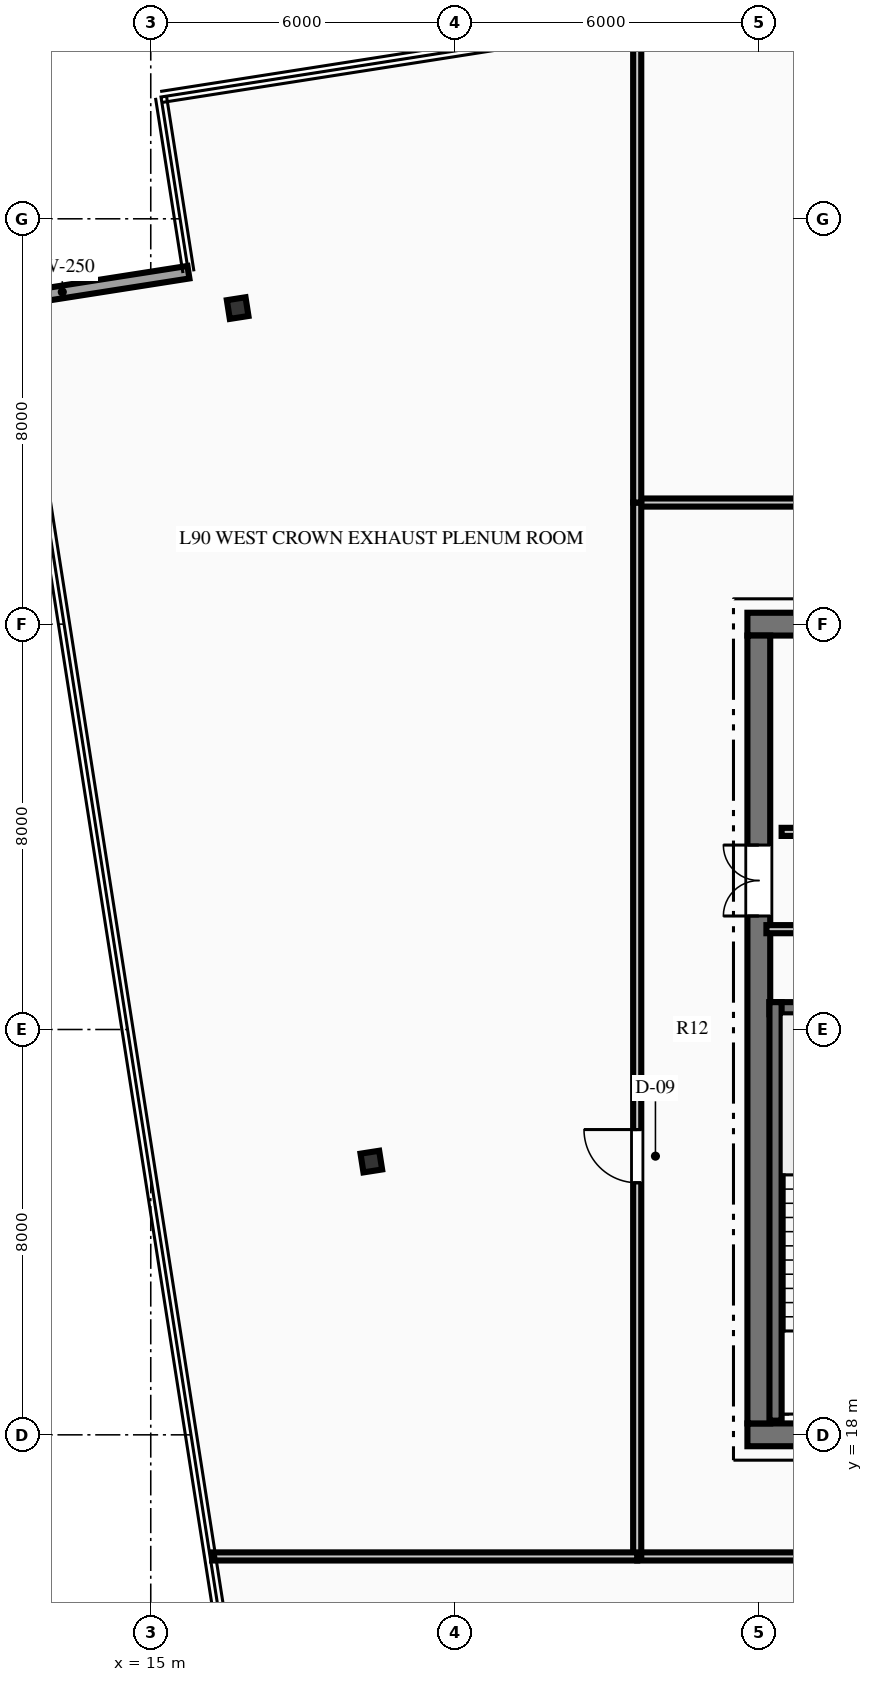
"""IFC4 building model, lengths in metres.
Left out: names, types, materials, properties, quantities, classifications, styles, units other than length and angle.
Written with IfcOpenShell. Run it as: python <this file> out.ifc"""

import sys

from ifc_helpers import new_model, si_unit, direction, frame, frame_2d, origin, origin_2d, place, context, subcontext, project, spatial, rectangle, i_section, extrude, element, fill, save


model = new_model("IFC4")
c1 = context("Model", 3, precision=1e-05, world=origin(), true_north=direction((0.0, 1.0)))
c2 = subcontext(c1, "Body", "Model", "MODEL_VIEW")
j1 = project(units=[si_unit("LENGTHUNIT", "METRE"), si_unit("PLANEANGLEUNIT", "RADIAN")], contexts=[c1])
p1 = place(None, origin())
s1 = spatial("IfcSite", under=j1, at=p1, CompositionType="ELEMENT")
p2 = place(p1, origin())
s2 = spatial("IfcBuilding", under=s1, at=p2, CompositionType="ELEMENT")
p3 = place(p2, frame((0.0, 0.0, 356.4)))
s3 = spatial("IfcBuildingStorey", under=s2, at=p3, CompositionType="ELEMENT", Elevation=356.4)
p4 = place(p3, frame((26.775, 18.0, 0.0), z_axis=(0.0, 0.0, 1.0), x_axis=(1.0, 0.0, 0.0)))
e1 = element("IfcWall", 1, at=p4, inside=s3, PredefinedType="SHEAR", context=c2, shape_type="SweptSolid", body=[
    extrude(rectangle(XDim=18.45, YDim=0.45, at=frame_2d((9.225, 0.0))), origin(), (0.0, 0.0, 1.0), 4.2),
])
p5 = place(p4, frame((7.325, 0.0, 0.0)))
e2 = element("IfcOpeningElement", 2, at=p5, cuts=e1, PredefinedType="OPENING", context=c2, shape_type="SweptSolid", body=[
    extrude(rectangle(XDim=1.1, YDim=2.15, at=frame_2d((0.55, 1.075))), frame((0.0, 0.235, 0.0), z_axis=(0.0, -1.0, 0.0), x_axis=(1.0, 0.0, 0.0)), (0.0, 0.0, 1.0), 0.47),
])
p6 = place(p4, frame((10.025, 0.0, 0.0)))
e3 = element("IfcOpeningElement", 3, at=p6, cuts=e1, PredefinedType="OPENING", context=c2, shape_type="SweptSolid", body=[
    extrude(rectangle(XDim=1.1, YDim=2.15, at=frame_2d((0.55, 1.075))), frame((0.0, 0.235, 0.0), z_axis=(0.0, -1.0, 0.0), x_axis=(1.0, 0.0, 0.0)), (0.0, 0.0, 1.0), 0.47),
])
p7 = place(p3, frame((26.775, 34.0, 0.0), z_axis=(0.0, 0.0, 1.0), x_axis=(1.0, 0.0, 0.0)))
e4 = element("IfcWall", 4, at=p7, inside=s3, PredefinedType="SHEAR", context=c2, shape_type="SweptSolid", body=[
    extrude(rectangle(XDim=18.45, YDim=0.45, at=frame_2d((9.225, 0.0))), origin(), (0.0, 0.0, 1.0), 4.2),
])
p8 = place(p3, frame((27.0, 18.225, 0.0), z_axis=(0.0, 0.0, 1.0), x_axis=(0.0, 1.0, 0.0)))
e5 = element("IfcWall", 5, at=p8, inside=s3, PredefinedType="SHEAR", context=c2, shape_type="SweptSolid", body=[
    extrude(rectangle(XDim=15.55, YDim=0.45, at=frame_2d((7.775, 0.0))), origin(), (0.0, 0.0, 1.0), 4.2),
])
p9 = place(p8, frame((10.015, 0.0, 0.0)))
e6 = element("IfcOpeningElement", 6, at=p9, cuts=e5, PredefinedType="OPENING", context=c2, shape_type="SweptSolid", body=[
    extrude(rectangle(XDim=1.4, YDim=2.2, at=frame_2d((0.7, 1.1))), frame((0.0, 0.235, 0.0), z_axis=(0.0, -1.0, 0.0), x_axis=(1.0, 0.0, 0.0)), (0.0, 0.0, 1.0), 0.47),
])
p10 = place(p3, frame((27.21, 26.42, 0.0), z_axis=(0.0, 0.0, 1.0), x_axis=(1.0, 0.0, 0.0)))
e7 = element("IfcWall", 7, at=p10, inside=s3, PredefinedType="SHEAR", context=c2, shape_type="SweptSolid", body=[
    extrude(rectangle(XDim=3.98, YDim=0.24, at=frame_2d((1.99, 0.0))), origin(), (0.0, 0.0, 1.0), 4.2),
])
p11 = place(p3, frame((27.33, 18.28, 0.0), z_axis=(0.0, 0.0, 1.0), x_axis=(0.0, 1.0, 0.0)))
e8 = element("IfcWall", 8, at=p11, inside=s3, PredefinedType="SHEAR", context=c2, shape_type="SweptSolid", body=[
    extrude(rectangle(XDim=8.26, YDim=0.24, at=frame_2d((4.13, 0.0))), origin(), (0.0, 0.0, 1.0), 4.2),
])
for number, where, z_axis, x_axis in (
    (9, (16.715, 40.238, 0.0), (0.0, 0.0, 1.0), (-0.155, 0.988, 0.0)),
    (10, (19.353, 23.393, 0.0), (0.0, 0.0, 1.0), (-0.155, 0.988, 0.0)),
):
    element("IfcColumn", number, at=place(p3, frame(where, z_axis=z_axis, x_axis=x_axis)), inside=s3, PredefinedType="COLUMN", context=c2, shape_type="SweptSolid", body=[
        extrude(i_section(OverallWidth=0.374, OverallDepth=0.373, WebThickness=0.016, FlangeThickness=0.026, at=origin_2d()), origin(), (0.0, 0.0, 1.0), 4.2),
    ])
p12 = place(p3, frame((12.286, 40.405, 0.0), z_axis=(0.0, 0.0, 1.0), x_axis=(0.987960113204, 0.154708806205, 0.0)))
e11 = element("IfcWall", 11, at=p12, inside=s3, PredefinedType="STANDARD", context=c2, shape_type="SweptSolid", body=[
    extrude(rectangle(XDim=3.5, YDim=0.25, at=frame_2d((1.75, 0.0))), origin(), (0.0, 0.0, 1.0), 3.93),
])
p13 = place(p3, frame((27.15, 27.98, 0.0), z_axis=(0.0, 0.0, 1.0), x_axis=(1.0, 0.0, 0.0)))
e12 = element("IfcWall", 12, at=p13, inside=s3, PredefinedType="PARTITIONING", context=c2, shape_type="SweptSolid", body=[
    extrude(rectangle(XDim=4.05, YDim=0.16, at=frame_2d((2.025, 0.0))), origin(), (0.0, 0.0, 1.0), 3.93),
])
p14 = place(p13, frame((1.575, 0.0, 0.0)))
e13 = element("IfcOpeningElement", 13, at=p14, cuts=e12, PredefinedType="OPENING", context=c2, shape_type="SweptSolid", body=[
    extrude(rectangle(XDim=0.95, YDim=2.15, at=frame_2d((0.475, 1.075))), frame((0.0, 0.09, 0.0), z_axis=(0.0, -1.0, 0.0), x_axis=(1.0, 0.0, 0.0)), (0.0, 0.0, 1.0), 0.18),
])
p15 = place(p3, frame((27.45, 29.9, 0.0), z_axis=(0.0, 0.0, 1.0), x_axis=(1.0, 0.0, 0.0)))
e14 = element("IfcWall", 14, at=p15, inside=s3, PredefinedType="PARTITIONING", context=c2, shape_type="SweptSolid", body=[
    extrude(rectangle(XDim=4.43, YDim=0.16, at=frame_2d((2.215, 0.0))), origin(), (0.0, 0.0, 1.0), 3.93),
])
p16 = place(p15, frame((1.675, 0.0, 0.0)))
e15 = element("IfcOpeningElement", 15, at=p16, cuts=e14, PredefinedType="OPENING", context=c2, shape_type="SweptSolid", body=[
    extrude(rectangle(XDim=0.95, YDim=2.15, at=frame_2d((0.475, 1.075))), frame((0.0, 0.09, 0.0), z_axis=(0.0, -1.0, 0.0), x_axis=(1.0, 0.0, 0.0)), (0.0, 0.0, 1.0), 0.18),
])
p17 = place(p3, frame((24.6, 15.6, 0.0), z_axis=(0.0, 0.0, 1.0), x_axis=(1.0, 0.0, 0.0)))
e16 = element("IfcWall", 16, at=p17, inside=s3, PredefinedType="PARTITIONING", context=c2, shape_type="SweptSolid", body=[
    extrude(rectangle(XDim=22.8, YDim=0.16, at=frame_2d((11.4, 0.0))), origin(), (0.0, 0.0, 1.0), 3.93),
])
p18 = place(p17, frame((6.875, 0.0, 0.0)))
e17 = element("IfcOpeningElement", 17, at=p18, cuts=e16, PredefinedType="OPENING", context=c2, shape_type="SweptSolid", body=[
    extrude(rectangle(XDim=1.05, YDim=2.15, at=frame_2d((0.525, 1.075))), frame((0.0, 0.09, 0.0), z_axis=(0.0, -1.0, 0.0), x_axis=(1.0, 0.0, 0.0)), (0.0, 0.0, 1.0), 0.18),
])
p19 = place(p17, frame((14.875, 0.0, 0.0)))
e18 = element("IfcOpeningElement", 18, at=p19, cuts=e16, PredefinedType="OPENING", context=c2, shape_type="SweptSolid", body=[
    extrude(rectangle(XDim=1.05, YDim=2.15, at=frame_2d((0.525, 1.075))), frame((0.0, 0.09, 0.0), z_axis=(0.0, -1.0, 0.0), x_axis=(1.0, 0.0, 0.0)), (0.0, 0.0, 1.0), 0.18),
])
p20 = place(p3, frame((24.6, 36.4, 0.0), z_axis=(0.0, 0.0, 1.0), x_axis=(1.0, 0.0, 0.0)))
e19 = element("IfcWall", 19, at=p20, inside=s3, PredefinedType="PARTITIONING", context=c2, shape_type="SweptSolid", body=[
    extrude(rectangle(XDim=22.8, YDim=0.16, at=frame_2d((11.4, 0.0))), origin(), (0.0, 0.0, 1.0), 3.93),
])
p21 = place(p20, frame((6.875, 0.0, 0.0)))
e20 = element("IfcOpeningElement", 20, at=p21, cuts=e19, PredefinedType="OPENING", context=c2, shape_type="SweptSolid", body=[
    extrude(rectangle(XDim=1.05, YDim=2.15, at=frame_2d((0.525, 1.075))), frame((0.0, 0.09, 0.0), z_axis=(0.0, -1.0, 0.0), x_axis=(1.0, 0.0, 0.0)), (0.0, 0.0, 1.0), 0.18),
])
p22 = place(p20, frame((14.875, 0.0, 0.0)))
e21 = element("IfcOpeningElement", 21, at=p22, cuts=e19, PredefinedType="OPENING", context=c2, shape_type="SweptSolid", body=[
    extrude(rectangle(XDim=1.05, YDim=2.15, at=frame_2d((0.525, 1.075))), frame((0.0, 0.09, 0.0), z_axis=(0.0, -1.0, 0.0), x_axis=(1.0, 0.0, 0.0)), (0.0, 0.0, 1.0), 0.18),
])
p23 = place(p3, frame((24.6, 15.6, 0.0), z_axis=(0.0, 0.0, 1.0), x_axis=(0.0, 1.0, 0.0)))
e22 = element("IfcWall", 22, at=p23, inside=s3, PredefinedType="PARTITIONING", context=c2, shape_type="SweptSolid", body=[
    extrude(rectangle(XDim=20.8, YDim=0.16, at=frame_2d((10.4, 0.0))), origin(), (0.0, 0.0, 1.0), 3.93),
])
p24 = place(p23, frame((7.375, 0.0, 0.0)))
e23 = element("IfcOpeningElement", 23, at=p24, cuts=e22, PredefinedType="OPENING", context=c2, shape_type="SweptSolid", body=[
    extrude(rectangle(XDim=1.05, YDim=2.15, at=frame_2d((0.525, 1.075))), frame((0.0, 0.09, 0.0), z_axis=(0.0, -1.0, 0.0), x_axis=(1.0, 0.0, 0.0)), (0.0, 0.0, 1.0), 0.18),
])
p25 = place(p3, frame((16.211, 15.6, 0.0), z_axis=(0.0, 0.0, 1.0), x_axis=(1.0, 0.0, 0.0)))
e24 = element("IfcWall", 24, at=p25, inside=s3, PredefinedType="PARTITIONING", context=c2, shape_type="SweptSolid", body=[
    extrude(rectangle(XDim=8.389, YDim=0.16, at=frame_2d((4.195, 0.0))), origin(), (0.0, 0.0, 1.0), 3.93),
])
p26 = place(p3, frame((24.6, 36.4, 0.0), z_axis=(0.0, 0.0, 1.0), x_axis=(0.0, 1.0, 0.0)))
e25 = element("IfcWall", 25, at=p26, inside=s3, PredefinedType="PARTITIONING", context=c2, shape_type="SweptSolid", body=[
    extrude(rectangle(XDim=9.435, YDim=0.16, at=frame_2d((4.718, 0.0))), origin(), (0.0, 0.0, 1.0), 3.93),
])
p27 = place(p9, origin())
e26 = element("IfcDoor", 26, at=p27, inside=s3, OperationType="DOUBLE_DOOR_SINGLE_SWING", PredefinedType="DOOR", context=c2, shape_type="SweptSolid", body=[
    extrude(rectangle(XDim=1.4, YDim=2.2, at=frame_2d((0.7, 1.1))), frame((0.0, 0.025, 0.0), z_axis=(0.0, -1.0, 0.0), x_axis=(1.0, 0.0, 0.0)), (0.0, 0.0, 1.0), 0.05),
])
fill(e6, e26)
p28 = place(p24, origin())
e27 = element("IfcDoor", 27, at=p28, inside=s3, OperationType="SINGLE_SWING_RIGHT", PredefinedType="DOOR", context=c2, shape_type="SweptSolid", body=[
    extrude(rectangle(XDim=1.05, YDim=2.15, at=frame_2d((0.525, 1.075))), frame((0.0, 0.025, 0.0), z_axis=(0.0, -1.0, 0.0), x_axis=(1.0, 0.0, 0.0)), (0.0, 0.0, 1.0), 0.05),
])
fill(e23, e27)
save(model, sys.argv[1])
